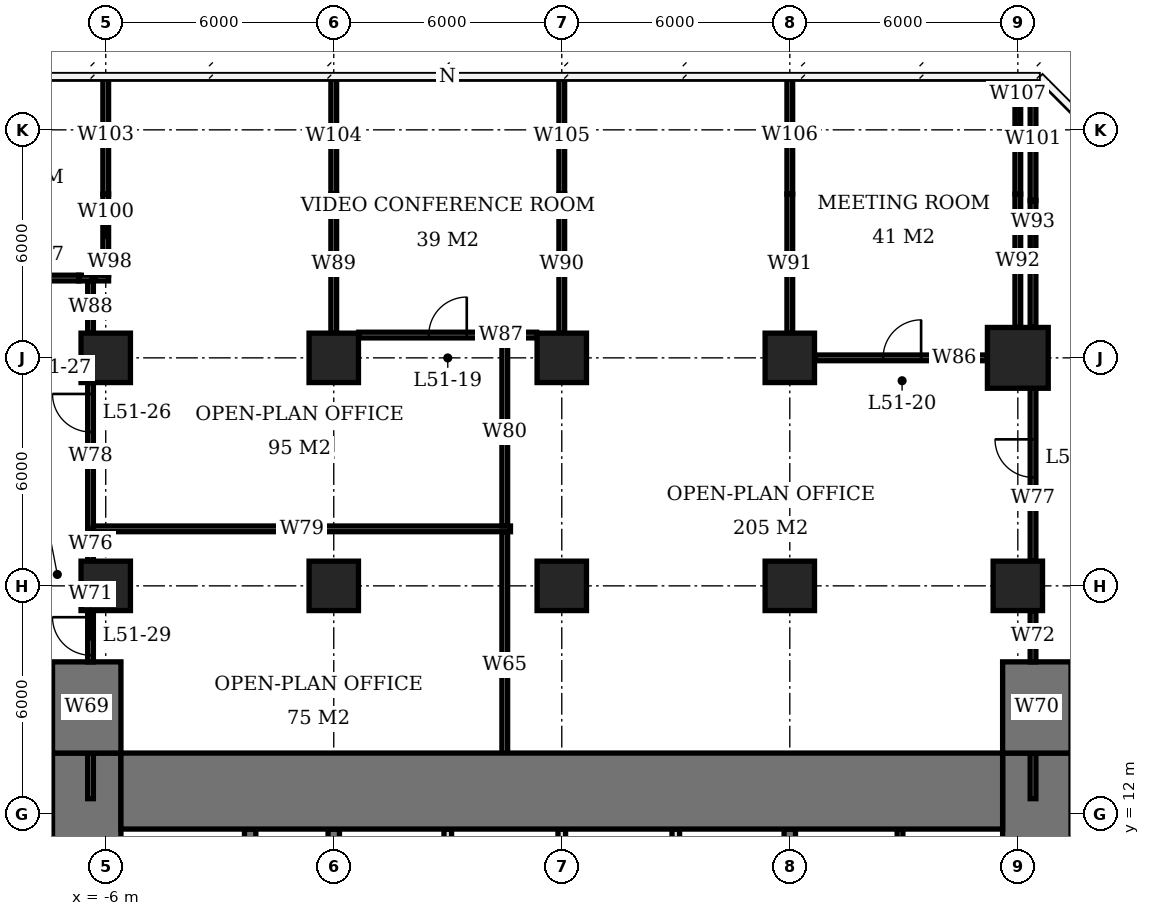
"""IFC4 building model, lengths in metres.
Left out: names, types, materials, properties, quantities, classifications, styles, units other than length and angle.
Written with IfcOpenShell. Run it as: python <this file> out.ifc"""

import sys

from ifc_helpers import new_model, si_unit, direction, frame, frame_2d, origin, origin_2d, place, context, subcontext, project, spatial, rectangle, extrude, element, fill, save


model = new_model("IFC4")
c1 = context("Model", 3, precision=1e-05, world=origin(), true_north=direction((0.0, 1.0)))
c2 = subcontext(c1, "Body", "Model", "MODEL_VIEW")
j1 = project(units=[si_unit("LENGTHUNIT", "METRE"), si_unit("PLANEANGLEUNIT", "RADIAN")], contexts=[c1])
p1 = place(None, origin())
s1 = spatial("IfcSite", under=j1, at=p1, CompositionType="ELEMENT")
p2 = place(p1, origin())
s2 = spatial("IfcBuilding", under=s1, at=p2, CompositionType="ELEMENT")
p3 = place(p2, frame((0.0, 0.0, 208.4)))
s3 = spatial("IfcBuildingStorey", under=s2, at=p3, CompositionType="ELEMENT", Elevation=208.4)
for number, where, z_axis, x_axis in (
    (1, (-6.0, 18.0, 0.0), (0.0, 0.0, 1.0), (1.0, 0.0, 0.0)),
    (2, (-6.0, 24.0, 0.0), (0.0, 0.0, 1.0), (1.0, 0.0, 0.0)),
    (3, (0.0, 18.0, 0.0), (0.0, 0.0, 1.0), (1.0, 0.0, 0.0)),
    (4, (0.0, 24.0, 0.0), (0.0, 0.0, 1.0), (1.0, 0.0, 0.0)),
    (5, (6.0, 18.0, 0.0), (0.0, 0.0, 1.0), (1.0, 0.0, 0.0)),
    (6, (6.0, 24.0, 0.0), (0.0, 0.0, 1.0), (1.0, 0.0, 0.0)),
    (7, (12.0, 18.0, 0.0), (0.0, 0.0, 1.0), (1.0, 0.0, 0.0)),
    (8, (12.0, 24.0, 0.0), (0.0, 0.0, 1.0), (1.0, 0.0, 0.0)),
    (9, (18.0, 18.0, 0.0), (0.0, 0.0, 1.0), (1.0, 0.0, 0.0)),
):
    element("IfcColumn", number, at=place(p3, frame(where, z_axis=z_axis, x_axis=x_axis)), inside=s3, PredefinedType="COLUMN", context=c2, shape_type="SweptSolid", body=[
        extrude(rectangle(XDim=1.3, YDim=1.3, at=origin_2d()), origin(), (0.0, 0.0, 1.0), 3.9),
    ])
p4 = place(p3, frame((18.0, 24.0, 0.0), z_axis=(0.0, 0.0, 1.0), x_axis=(1.0, 0.0, 0.0)))
e10 = element("IfcColumn", 10, at=p4, inside=s3, PredefinedType="COLUMN", context=c2, shape_type="SweptSolid", body=[
    extrude(rectangle(XDim=1.6, YDim=1.6, at=origin_2d()), origin(), (0.0, 0.0, 1.0), 3.9),
])
p5 = place(p3, frame((-5.6, 12.6, 0.0), z_axis=(0.0, 0.0, 1.0), x_axis=(1.0, 0.0, 0.0)))
e11 = element("IfcWall", 11, at=p5, inside=s3, PredefinedType="SHEAR", context=c2, shape_type="SweptSolid", body=[
    extrude(rectangle(XDim=23.2, YDim=2.0, at=frame_2d((11.6, 0.0))), origin(), (0.0, 0.0, 1.0), 3.9),
])
p6 = place(p3, frame((-6.5, -7.6, 0.0), z_axis=(0.0, 0.0, 1.0), x_axis=(0.0, 1.0, 0.0)))
e12 = element("IfcWall", 12, at=p6, inside=s3, PredefinedType="SHEAR", context=c2, shape_type="SweptSolid", body=[
    extrude(rectangle(XDim=21.2, YDim=1.8, at=frame_2d((10.6, 0.0))), origin(), (0.0, 0.0, 1.0), 3.9),
])
p7 = place(p6, frame((7.8, 0.0, 0.0)))
e13 = element("IfcOpeningElement", 13, at=p7, cuts=e12, PredefinedType="OPENING", context=c2, shape_type="SweptSolid", body=[
    extrude(rectangle(XDim=1.8, YDim=2.4, at=frame_2d((0.9, 1.2))), frame((0.0, 0.91, 0.0), z_axis=(0.0, -1.0, 0.0), x_axis=(1.0, 0.0, 0.0)), (0.0, 0.0, 1.0), 1.82),
])
p8 = place(p3, frame((18.5, -7.6, 0.0), z_axis=(0.0, 0.0, 1.0), x_axis=(0.0, 1.0, 0.0)))
e14 = element("IfcWall", 14, at=p8, inside=s3, PredefinedType="SHEAR", context=c2, shape_type="SweptSolid", body=[
    extrude(rectangle(XDim=21.2, YDim=1.8, at=frame_2d((10.6, 0.0))), origin(), (0.0, 0.0, 1.0), 3.9),
])
p9 = place(p8, frame((9.2, 0.0, 0.0)))
e15 = element("IfcOpeningElement", 15, at=p9, cuts=e14, PredefinedType="OPENING", context=c2, shape_type="SweptSolid", body=[
    extrude(rectangle(XDim=1.8, YDim=2.4, at=frame_2d((0.9, 1.2))), frame((0.0, 0.91, 0.0), z_axis=(0.0, -1.0, 0.0), x_axis=(1.0, 0.0, 0.0)), (0.0, 0.0, 1.0), 1.82),
])
for number, where, z_axis, x_axis in (
    (16, (-6.5, 13.6, 0.0), (0.0, 0.0, 1.0), (0.0, 1.0, 0.0)),
    (17, (18.5, 13.6, 0.0), (0.0, 0.0, 1.0), (0.0, 1.0, 0.0)),
):
    element("IfcWall", number, at=place(p3, frame(where, z_axis=z_axis, x_axis=x_axis)), inside=s3, PredefinedType="SHEAR", context=c2, shape_type="SweptSolid", body=[
        extrude(rectangle(XDim=2.4, YDim=1.8, at=frame_2d((1.2, 0.0))), origin(), (0.0, 0.0, 1.0), 3.9),
    ])
p10 = place(p3, frame((0.0, 3.15, 0.0), z_axis=(0.0, 0.0, 1.0), x_axis=(0.0, 1.0, 0.0)))
e18 = element("IfcWall", 18, at=p10, inside=s3, PredefinedType="SHEAR", context=c2, shape_type="SweptSolid", body=[
    extrude(rectangle(XDim=8.45, YDim=0.3, at=frame_2d((4.225, 0.0))), origin(), (0.0, 0.0, 1.0), 3.9),
])
p11 = place(p3, frame((12.0, 6.15, 0.0), z_axis=(0.0, 0.0, 1.0), x_axis=(0.0, 1.0, 0.0)))
e19 = element("IfcWall", 19, at=p11, inside=s3, PredefinedType="SHEAR", context=c2, shape_type="SweptSolid", body=[
    extrude(rectangle(XDim=5.45, YDim=0.3, at=frame_2d((2.725, 0.0))), origin(), (0.0, 0.0, 1.0), 3.9),
])
p12 = place(p3, frame((-2.2, 3.15, 0.0), z_axis=(0.0, 0.0, 1.0), x_axis=(0.0, 1.0, 0.0)))
e20 = element("IfcWall", 20, at=p12, inside=s3, PredefinedType="SHEAR", context=c2, shape_type="SweptSolid", body=[
    extrude(rectangle(XDim=8.45, YDim=0.3, at=frame_2d((4.225, 0.0))), origin(), (0.0, 0.0, 1.0), 3.9),
])
for number, where, z_axis, x_axis in (
    (21, (3.0, 6.15, 0.0), (0.0, 0.0, 1.0), (0.0, 1.0, 0.0)),
    (22, (6.0, 6.15, 0.0), (0.0, 0.0, 1.0), (0.0, 1.0, 0.0)),
    (23, (9.0, 6.15, 0.0), (0.0, 0.0, 1.0), (0.0, 1.0, 0.0)),
):
    element("IfcWall", number, at=place(p3, frame(where, z_axis=z_axis, x_axis=x_axis)), inside=s3, PredefinedType="SOLIDWALL", context=c2, shape_type="SweptSolid", body=[
        extrude(rectangle(XDim=5.45, YDim=0.2, at=frame_2d((2.725, 0.0))), origin(), (0.0, 0.0, 1.0), 3.9),
    ])
p13 = place(p3, frame((14.9, 6.15, 0.0), z_axis=(0.0, 0.0, 1.0), x_axis=(0.0, 1.0, 0.0)))
e24 = element("IfcWall", 24, at=p13, inside=s3, PredefinedType="PLUMBINGWALL", context=c2, shape_type="SweptSolid", body=[
    extrude(rectangle(XDim=5.45, YDim=0.15, at=frame_2d((2.725, 0.0))), origin(), (0.0, 0.0, 1.0), 3.65),
])
p14 = place(p3, frame((12.66, 24.0, 0.0), z_axis=(0.0, 0.0, 1.0), x_axis=(1.0, 0.0, 0.0)))
e25 = element("IfcWall", 25, at=p14, inside=s3, PredefinedType="PARTITIONING", context=c2, shape_type="SweptSolid", body=[
    extrude(rectangle(XDim=4.54, YDim=0.15, at=frame_2d((2.27, 0.0))), origin(), (0.0, 0.0, 1.0), 3.65),
])
p15 = place(p14, frame((1.795, 0.0, 0.0)))
e26 = element("IfcOpeningElement", 26, at=p15, cuts=e25, PredefinedType="OPENING", context=c2, shape_type="SweptSolid", body=[
    extrude(rectangle(XDim=1.0, YDim=2.1, at=frame_2d((0.5, 1.05))), frame((0.0, 0.085, 0.0), z_axis=(0.0, -1.0, 0.0), x_axis=(1.0, 0.0, 0.0)), (0.0, 0.0, 1.0), 0.17),
])
p16 = place(p3, frame((0.66, 24.6, 0.0), z_axis=(0.0, 0.0, 1.0), x_axis=(1.0, 0.0, 0.0)))
e27 = element("IfcWall", 27, at=p16, inside=s3, PredefinedType="PARTITIONING", context=c2, shape_type="SweptSolid", body=[
    extrude(rectangle(XDim=4.68, YDim=0.15, at=frame_2d((2.34, 0.0))), origin(), (0.0, 0.0, 1.0), 3.65),
])
p17 = place(p16, frame((1.84, 0.0, 0.0)))
e28 = element("IfcOpeningElement", 28, at=p17, cuts=e27, PredefinedType="OPENING", context=c2, shape_type="SweptSolid", body=[
    extrude(rectangle(XDim=1.0, YDim=2.1, at=frame_2d((0.5, 1.05))), frame((0.0, 0.085, 0.0), z_axis=(0.0, -1.0, 0.0), x_axis=(1.0, 0.0, 0.0)), (0.0, 0.0, 1.0), 0.17),
])
p18 = place(p3, frame((-11.49, 26.1, 0.0), z_axis=(0.0, 0.0, 1.0), x_axis=(1.0, 0.0, 0.0)))
e29 = element("IfcWall", 29, at=p18, inside=s3, PredefinedType="PARTITIONING", context=c2, shape_type="SweptSolid", body=[
    extrude(rectangle(XDim=4.78, YDim=0.15, at=frame_2d((2.39, 0.0))), origin(), (0.0, 0.0, 1.0), 3.65),
])
p19 = place(p18, frame((1.89, 0.0, 0.0)))
e30 = element("IfcOpeningElement", 30, at=p19, cuts=e29, PredefinedType="OPENING", context=c2, shape_type="SweptSolid", body=[
    extrude(rectangle(XDim=1.0, YDim=2.1, at=frame_2d((0.5, 1.05))), frame((0.0, 0.085, 0.0), z_axis=(0.0, -1.0, 0.0), x_axis=(1.0, 0.0, 0.0)), (0.0, 0.0, 1.0), 0.17),
])
p20 = place(p3, frame((-6.71, 26.1, 0.0), z_axis=(0.0, 0.0, 1.0), x_axis=(1.0, 0.0, 0.0)))
e31 = element("IfcWall", 31, at=p20, inside=s3, PredefinedType="PARTITIONING", context=c2, shape_type="SweptSolid", body=[
    extrude(rectangle(XDim=0.785, YDim=0.15, at=frame_2d((0.393, 0.0))), origin(), (0.0, 0.0, 1.0), 2.65),
])
p21 = place(p3, frame((-6.0, 26.175, 0.0), z_axis=(0.0, 0.0, 1.0), x_axis=(0.0, 1.0, 0.0)))
e32 = element("IfcWall", 32, at=p21, inside=s3, PredefinedType="PARTITIONING", context=c2, shape_type="SweptSolid", body=[
    extrude(rectangle(XDim=2.135, YDim=0.15, at=frame_2d((1.067, 0.0))), origin(), (0.0, 0.0, 1.0), 2.65),
])
p22 = place(p3, frame((-6.0, 28.31, 0.0), z_axis=(0.0, 0.0, 1.0), x_axis=(0.0, 1.0, 0.0)))
e33 = element("IfcWall", 33, at=p22, inside=s3, PredefinedType="PARTITIONING", context=c2, shape_type="SweptSolid", body=[
    extrude(rectangle(XDim=3.09, YDim=0.15, at=frame_2d((1.545, 0.0))), origin(), (0.0, 0.0, 1.0), 3.65),
])
p23 = place(p3, frame((0.0, 24.65, 0.0), z_axis=(0.0, 0.0, 1.0), x_axis=(0.0, 1.0, 0.0)))
e34 = element("IfcWall", 34, at=p23, inside=s3, PredefinedType="PARTITIONING", context=c2, shape_type="SweptSolid", body=[
    extrude(rectangle(XDim=3.66, YDim=0.15, at=frame_2d((1.83, 0.0))), origin(), (0.0, 0.0, 1.0), 2.65),
])
p24 = place(p3, frame((0.0, 28.31, 0.0), z_axis=(0.0, 0.0, 1.0), x_axis=(0.0, 1.0, 0.0)))
e35 = element("IfcWall", 35, at=p24, inside=s3, PredefinedType="PARTITIONING", context=c2, shape_type="SweptSolid", body=[
    extrude(rectangle(XDim=3.04, YDim=0.15, at=frame_2d((1.52, 0.0))), origin(), (0.0, 0.0, 1.0), 3.65),
])
p25 = place(p3, frame((6.0, 24.65, 0.0), z_axis=(0.0, 0.0, 1.0), x_axis=(0.0, 1.0, 0.0)))
e36 = element("IfcWall", 36, at=p25, inside=s3, PredefinedType="PARTITIONING", context=c2, shape_type="SweptSolid", body=[
    extrude(rectangle(XDim=3.66, YDim=0.15, at=frame_2d((1.83, 0.0))), origin(), (0.0, 0.0, 1.0), 2.65),
])
p26 = place(p3, frame((6.0, 28.31, 0.0), z_axis=(0.0, 0.0, 1.0), x_axis=(0.0, 1.0, 0.0)))
e37 = element("IfcWall", 37, at=p26, inside=s3, PredefinedType="PARTITIONING", context=c2, shape_type="SweptSolid", body=[
    extrude(rectangle(XDim=3.04, YDim=0.15, at=frame_2d((1.52, 0.0))), origin(), (0.0, 0.0, 1.0), 3.65),
])
p27 = place(p3, frame((12.0, 24.65, 0.0), z_axis=(0.0, 0.0, 1.0), x_axis=(0.0, 1.0, 0.0)))
e38 = element("IfcWall", 38, at=p27, inside=s3, PredefinedType="PARTITIONING", context=c2, shape_type="SweptSolid", body=[
    extrude(rectangle(XDim=3.66, YDim=0.15, at=frame_2d((1.83, 0.0))), origin(), (0.0, 0.0, 1.0), 2.65),
])
p28 = place(p3, frame((12.0, 28.31, 0.0), z_axis=(0.0, 0.0, 1.0), x_axis=(0.0, 1.0, 0.0)))
e39 = element("IfcWall", 39, at=p28, inside=s3, PredefinedType="PARTITIONING", context=c2, shape_type="SweptSolid", body=[
    extrude(rectangle(XDim=3.09, YDim=0.15, at=frame_2d((1.545, 0.0))), origin(), (0.0, 0.0, 1.0), 3.65),
])
p29 = place(p3, frame((18.0, 24.8, 0.0), z_axis=(0.0, 0.0, 1.0), x_axis=(0.0, 1.0, 0.0)))
e40 = element("IfcWall", 40, at=p29, inside=s3, PredefinedType="PARTITIONING", context=c2, shape_type="SweptSolid", body=[
    extrude(rectangle(XDim=3.51, YDim=0.15, at=frame_2d((1.755, 0.0))), origin(), (0.0, 0.0, 1.0), 2.65),
])
p30 = place(p3, frame((18.0, 28.31, 0.0), z_axis=(0.0, 0.0, 1.0), x_axis=(0.0, 1.0, 0.0)))
e41 = element("IfcWall", 41, at=p30, inside=s3, PredefinedType="PARTITIONING", context=c2, shape_type="SweptSolid", body=[
    extrude(rectangle(XDim=3.09, YDim=0.15, at=frame_2d((1.545, 0.0))), origin(), (0.0, 0.0, 1.0), 3.65),
])
p31 = place(p3, frame((-6.4, 12.4, 0.0), z_axis=(0.0, 0.0, 1.0), x_axis=(0.0, 1.0, 0.0)))
e42 = element("IfcWall", 42, at=p31, inside=s3, PredefinedType="PARTITIONING", context=c2, shape_type="SweptSolid", body=[
    extrude(rectangle(XDim=1.2, YDim=0.15, at=frame_2d((0.6, 0.0))), origin(), (0.0, 0.0, 1.0), 3.65),
])
p32 = place(p3, frame((-6.4, 16.0, 0.0), z_axis=(0.0, 0.0, 1.0), x_axis=(0.0, 1.0, 0.0)))
e43 = element("IfcWall", 43, at=p32, inside=s3, PredefinedType="PARTITIONING", context=c2, shape_type="SweptSolid", body=[
    extrude(rectangle(XDim=1.35, YDim=0.15, at=frame_2d((0.675, 0.0))), origin(), (0.0, 0.0, 1.0), 3.65),
])
p33 = place(p32, frame((0.175, 0.0, 0.0)))
e44 = element("IfcOpeningElement", 44, at=p33, cuts=e43, PredefinedType="OPENING", context=c2, shape_type="SweptSolid", body=[
    extrude(rectangle(XDim=1.0, YDim=2.1, at=frame_2d((0.5, 1.05))), frame((0.0, 0.085, 0.0), z_axis=(0.0, -1.0, 0.0), x_axis=(1.0, 0.0, 0.0)), (0.0, 0.0, 1.0), 0.17),
])
p34 = place(p3, frame((-6.4, 18.65, 0.0), z_axis=(0.0, 0.0, 1.0), x_axis=(0.0, 1.0, 0.0)))
e45 = element("IfcWall", 45, at=p34, inside=s3, PredefinedType="PARTITIONING", context=c2, shape_type="SweptSolid", body=[
    extrude(rectangle(XDim=0.925, YDim=0.15, at=frame_2d((0.462, 0.0))), origin(), (0.0, 0.0, 1.0), 3.65),
])
p35 = place(p3, frame((-6.4, 19.5, 0.0), z_axis=(0.0, 0.0, 1.0), x_axis=(0.0, 1.0, 0.0)))
e46 = element("IfcWall", 46, at=p35, inside=s3, PredefinedType="PARTITIONING", context=c2, shape_type="SweptSolid", body=[
    extrude(rectangle(XDim=3.85, YDim=0.15, at=frame_2d((1.925, 0.0))), origin(), (0.0, 0.0, 1.0), 3.65),
])
p36 = place(p35, frame((2.55, 0.0, 0.0)))
e47 = element("IfcOpeningElement", 47, at=p36, cuts=e46, PredefinedType="OPENING", context=c2, shape_type="SweptSolid", body=[
    extrude(rectangle(XDim=1.0, YDim=2.1, at=frame_2d((0.5, 1.05))), frame((0.0, 0.085, 0.0), z_axis=(0.0, -1.0, 0.0), x_axis=(1.0, 0.0, 0.0)), (0.0, 0.0, 1.0), 0.17),
])
p37 = place(p3, frame((-6.4, 24.65, 0.0), z_axis=(0.0, 0.0, 1.0), x_axis=(0.0, 1.0, 0.0)))
e48 = element("IfcWall", 48, at=p37, inside=s3, PredefinedType="PARTITIONING", context=c2, shape_type="SweptSolid", body=[
    extrude(rectangle(XDim=1.375, YDim=0.15, at=frame_2d((0.688, 0.0))), origin(), (0.0, 0.0, 1.0), 2.65),
])
p38 = place(p3, frame((-6.325, 19.5, 0.0), z_axis=(0.0, 0.0, 1.0), x_axis=(1.0, 0.0, 0.0)))
e49 = element("IfcWall", 49, at=p38, inside=s3, PredefinedType="PARTITIONING", context=c2, shape_type="SweptSolid", body=[
    extrude(rectangle(XDim=10.975, YDim=0.15, at=frame_2d((5.487, 0.0))), origin(), (0.0, 0.0, 1.0), 3.65),
])
p39 = place(p3, frame((4.5, 12.4, 0.0), z_axis=(0.0, 0.0, 1.0), x_axis=(0.0, 1.0, 0.0)))
e50 = element("IfcWall", 50, at=p39, inside=s3, PredefinedType="PARTITIONING", context=c2, shape_type="SweptSolid", body=[
    extrude(rectangle(XDim=7.025, YDim=0.15, at=frame_2d((3.513, 0.0))), origin(), (0.0, 0.0, 1.0), 3.65),
])
p40 = place(p3, frame((4.5, 19.575, 0.0), z_axis=(0.0, 0.0, 1.0), x_axis=(0.0, 1.0, 0.0)))
e51 = element("IfcWall", 51, at=p40, inside=s3, PredefinedType="PARTITIONING", context=c2, shape_type="SweptSolid", body=[
    extrude(rectangle(XDim=4.95, YDim=0.15, at=frame_2d((2.475, 0.0))), origin(), (0.0, 0.0, 1.0), 3.65),
])
p41 = place(p3, frame((18.4, 12.4, 0.0), z_axis=(0.0, 0.0, 1.0), x_axis=(0.0, 1.0, 0.0)))
e52 = element("IfcWall", 52, at=p41, inside=s3, PredefinedType="PARTITIONING", context=c2, shape_type="SweptSolid", body=[
    extrude(rectangle(XDim=1.2, YDim=0.15, at=frame_2d((0.6, 0.0))), origin(), (0.0, 0.0, 1.0), 3.65),
])
p42 = place(p3, frame((18.4, 16.0, 0.0), z_axis=(0.0, 0.0, 1.0), x_axis=(0.0, 1.0, 0.0)))
e53 = element("IfcWall", 53, at=p42, inside=s3, PredefinedType="PARTITIONING", context=c2, shape_type="SweptSolid", body=[
    extrude(rectangle(XDim=1.35, YDim=0.15, at=frame_2d((0.675, 0.0))), origin(), (0.0, 0.0, 1.0), 3.65),
])
p43 = place(p3, frame((18.4, 18.65, 0.0), z_axis=(0.0, 0.0, 1.0), x_axis=(0.0, 1.0, 0.0)))
e54 = element("IfcWall", 54, at=p43, inside=s3, PredefinedType="PARTITIONING", context=c2, shape_type="SweptSolid", body=[
    extrude(rectangle(XDim=4.55, YDim=0.15, at=frame_2d((2.275, 0.0))), origin(), (0.0, 0.0, 1.0), 3.65),
])
p44 = place(p43, frame((2.205, 0.0, 0.0)))
e55 = element("IfcOpeningElement", 55, at=p44, cuts=e54, PredefinedType="OPENING", context=c2, shape_type="SweptSolid", body=[
    extrude(rectangle(XDim=1.0, YDim=2.1, at=frame_2d((0.5, 1.05))), frame((0.0, 0.085, 0.0), z_axis=(0.0, -1.0, 0.0), x_axis=(1.0, 0.0, 0.0)), (0.0, 0.0, 1.0), 0.17),
])
p45 = place(p3, frame((18.4, 24.8, 0.0), z_axis=(0.0, 0.0, 1.0), x_axis=(0.0, 1.0, 0.0)))
e56 = element("IfcWall", 56, at=p45, inside=s3, PredefinedType="PARTITIONING", context=c2, shape_type="SweptSolid", body=[
    extrude(rectangle(XDim=3.34, YDim=0.15, at=frame_2d((1.67, 0.0))), origin(), (0.0, 0.0, 1.0), 2.65),
])
p46 = place(p3, frame((18.4, 28.14, 0.0), z_axis=(0.0, 0.0, 1.0), x_axis=(0.0, 1.0, 0.0)))
e57 = element("IfcWall", 57, at=p46, inside=s3, PredefinedType="PARTITIONING", context=c2, shape_type="SweptSolid", body=[
    extrude(rectangle(XDim=3.26, YDim=0.15, at=frame_2d((1.63, 0.0))), origin(), (0.0, 0.0, 1.0), 3.65),
])
p47 = place(p17, origin())
e58 = element("IfcDoor", 58, at=p47, inside=s3, OperationType="SINGLE_SWING_RIGHT", PredefinedType="DOOR", context=c2, shape_type="SweptSolid", body=[
    extrude(rectangle(XDim=1.0, YDim=2.1, at=frame_2d((0.5, 1.05))), frame((0.0, 0.025, 0.0), z_axis=(0.0, -1.0, 0.0), x_axis=(1.0, 0.0, 0.0)), (0.0, 0.0, 1.0), 0.05),
])
fill(e28, e58)
p48 = place(p15, origin())
e59 = element("IfcDoor", 59, at=p48, inside=s3, OperationType="SINGLE_SWING_RIGHT", PredefinedType="DOOR", context=c2, shape_type="SweptSolid", body=[
    extrude(rectangle(XDim=1.0, YDim=2.1, at=frame_2d((0.5, 1.05))), frame((0.0, 0.025, 0.0), z_axis=(0.0, -1.0, 0.0), x_axis=(1.0, 0.0, 0.0)), (0.0, 0.0, 1.0), 0.05),
])
fill(e26, e59)
p49 = place(p36, origin())
e60 = element("IfcDoor", 60, at=p49, inside=s3, OperationType="SINGLE_SWING_RIGHT", PredefinedType="DOOR", context=c2, shape_type="SweptSolid", body=[
    extrude(rectangle(XDim=1.0, YDim=2.1, at=frame_2d((0.5, 1.05))), frame((0.0, 0.025, 0.0), z_axis=(0.0, -1.0, 0.0), x_axis=(1.0, 0.0, 0.0)), (0.0, 0.0, 1.0), 0.05),
])
fill(e47, e60)
p50 = place(p44, origin())
e61 = element("IfcDoor", 61, at=p50, inside=s3, OperationType="SINGLE_SWING_RIGHT", PredefinedType="DOOR", context=c2, shape_type="SweptSolid", body=[
    extrude(rectangle(XDim=1.0, YDim=2.1, at=frame_2d((0.5, 1.05))), frame((0.0, 0.025, 0.0), z_axis=(0.0, -1.0, 0.0), x_axis=(1.0, 0.0, 0.0)), (0.0, 0.0, 1.0), 0.05),
])
fill(e55, e61)
p51 = place(p33, origin())
e62 = element("IfcDoor", 62, at=p51, inside=s3, OperationType="SINGLE_SWING_RIGHT", PredefinedType="DOOR", context=c2, shape_type="SweptSolid", body=[
    extrude(rectangle(XDim=1.0, YDim=2.1, at=frame_2d((0.5, 1.05))), frame((0.0, 0.025, 0.0), z_axis=(0.0, -1.0, 0.0), x_axis=(1.0, 0.0, 0.0)), (0.0, 0.0, 1.0), 0.05),
])
fill(e44, e62)
save(model, sys.argv[1])
